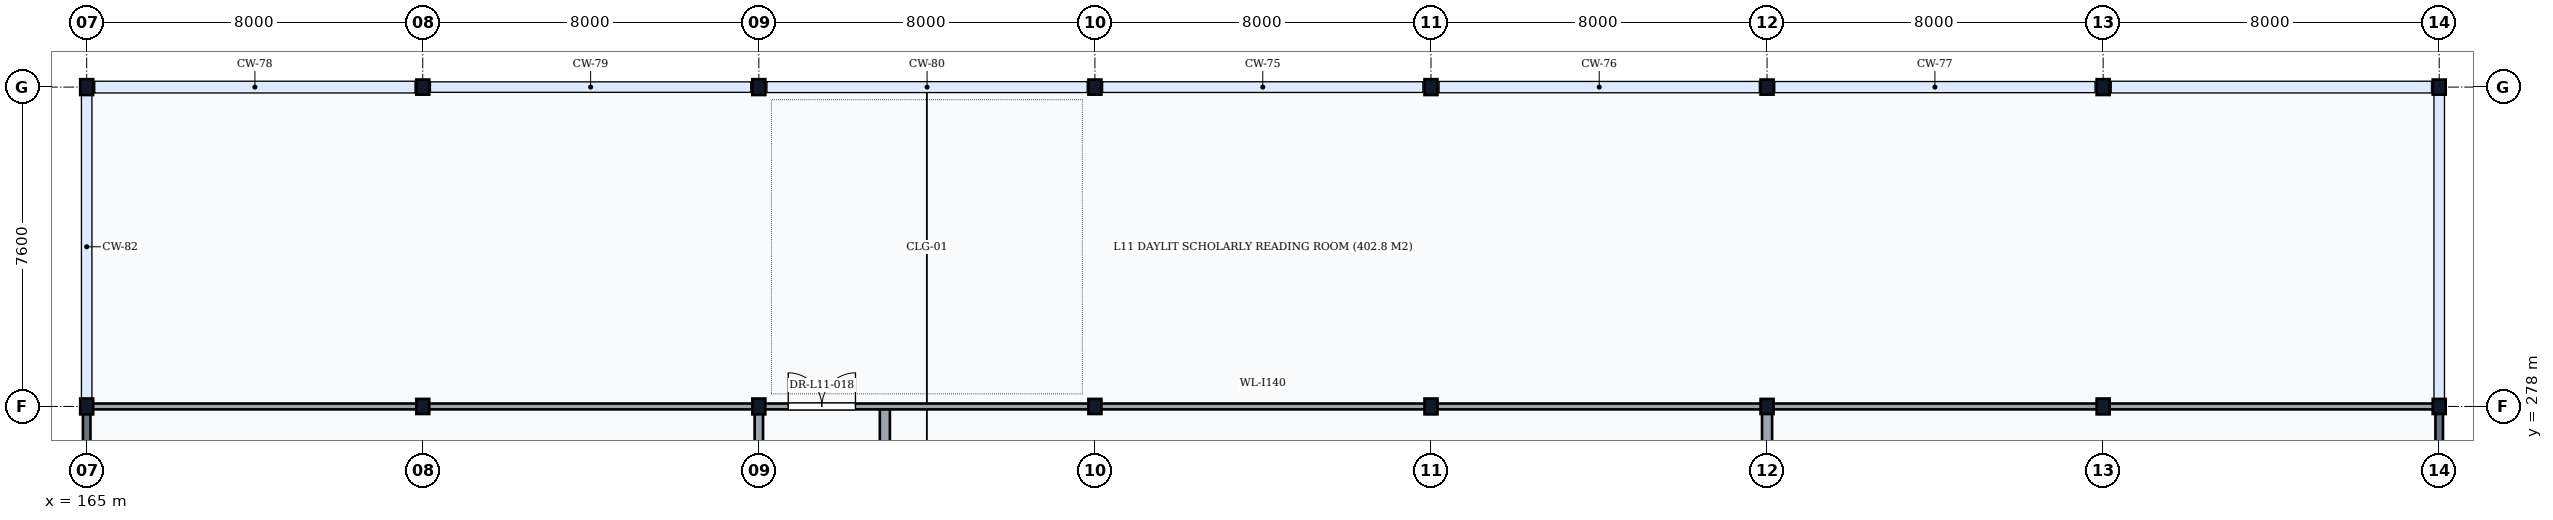
"""IFC4 building model, lengths in metres.
Left out: names, types, materials, properties, quantities, classifications, styles, units other than length and angle.
Written with IfcOpenShell. Run it as: python <this file> out.ifc"""

import sys

from ifc_helpers import new_model, si_unit, direction, frame, frame_2d, origin, origin_2d, place, context, subcontext, project, spatial, rectangle, i_section, extrude, element, fill, save


model = new_model("IFC4")
c1 = context("Model", 3, precision=1e-05, world=origin(), true_north=direction((0.0, 1.0)))
c2 = subcontext(c1, "Body", "Model", "MODEL_VIEW")
j1 = project(units=[si_unit("LENGTHUNIT", "METRE"), si_unit("PLANEANGLEUNIT", "RADIAN")], contexts=[c1])
p1 = place(None, origin())
s1 = spatial("IfcSite", under=j1, at=p1, CompositionType="ELEMENT")
p2 = place(p1, origin())
s2 = spatial("IfcBuilding", under=s1, at=p2, CompositionType="ELEMENT")
p3 = place(p2, frame((0.0, 0.0, 43.8)))
s3 = spatial("IfcBuildingStorey", under=s2, at=p3, CompositionType="ELEMENT", Elevation=43.8)
for number, where, z_axis, x_axis in (
    (1, (165.0, 278.0, 0.0), (0.0, 0.0, 1.0), (1.0, 0.0, 0.0)),
    (2, (165.0, 285.6, 0.0), (0.0, 0.0, 1.0), (1.0, 0.0, 0.0)),
):
    element("IfcColumn", number, at=place(p3, frame(where, z_axis=z_axis, x_axis=x_axis)), inside=s3, PredefinedType="COLUMN", context=c2, shape_type="SweptSolid", body=[
        extrude(i_section(OverallWidth=0.309, OverallDepth=0.377, WebThickness=0.021, FlangeThickness=0.04, FilletRadius=0.027, at=origin_2d()), origin(), (0.0, 0.0, 1.0), 3.9),
    ])
for number, where, z_axis, x_axis in (
    (3, (173.0, 278.0, 0.0), (0.0, 0.0, 1.0), (1.0, 0.0, 0.0)),
    (4, (173.0, 285.6, 0.0), (0.0, 0.0, 1.0), (1.0, 0.0, 0.0)),
):
    element("IfcColumn", number, at=place(p3, frame(where, z_axis=z_axis, x_axis=x_axis)), inside=s3, PredefinedType="COLUMN", context=c2, shape_type="SweptSolid", body=[
        extrude(i_section(OverallWidth=0.309, OverallDepth=0.359, WebThickness=0.021, FlangeThickness=0.04, FilletRadius=0.027, at=origin_2d()), origin(), (0.0, 0.0, 1.0), 3.9),
    ])
for number, where, z_axis, x_axis in (
    (5, (181.0, 278.0, 0.0), (0.0, 0.0, 1.0), (1.0, 0.0, 0.0)),
    (6, (181.0, 285.6, 0.0), (0.0, 0.0, 1.0), (1.0, 0.0, 0.0)),
):
    element("IfcColumn", number, at=place(p3, frame(where, z_axis=z_axis, x_axis=x_axis)), inside=s3, PredefinedType="COLUMN", context=c2, shape_type="SweptSolid", body=[
        extrude(i_section(OverallWidth=0.309, OverallDepth=0.377, WebThickness=0.021, FlangeThickness=0.04, FilletRadius=0.027, at=origin_2d()), origin(), (0.0, 0.0, 1.0), 3.9),
    ])
for number, where, z_axis, x_axis in (
    (7, (189.0, 278.0, 0.0), (0.0, 0.0, 1.0), (1.0, 0.0, 0.0)),
    (8, (189.0, 285.6, 0.0), (0.0, 0.0, 1.0), (1.0, 0.0, 0.0)),
):
    element("IfcColumn", number, at=place(p3, frame(where, z_axis=z_axis, x_axis=x_axis)), inside=s3, PredefinedType="COLUMN", context=c2, shape_type="SweptSolid", body=[
        extrude(i_section(OverallWidth=0.309, OverallDepth=0.359, WebThickness=0.021, FlangeThickness=0.04, FilletRadius=0.027, at=origin_2d()), origin(), (0.0, 0.0, 1.0), 3.9),
    ])
for number, where, z_axis, x_axis in (
    (9, (197.0, 278.0, 0.0), (0.0, 0.0, 1.0), (1.0, 0.0, 0.0)),
    (10, (197.0, 285.6, 0.0), (0.0, 0.0, 1.0), (1.0, 0.0, 0.0)),
):
    element("IfcColumn", number, at=place(p3, frame(where, z_axis=z_axis, x_axis=x_axis)), inside=s3, PredefinedType="COLUMN", context=c2, shape_type="SweptSolid", body=[
        extrude(i_section(OverallWidth=0.309, OverallDepth=0.377, WebThickness=0.021, FlangeThickness=0.04, FilletRadius=0.027, at=origin_2d()), origin(), (0.0, 0.0, 1.0), 3.9),
    ])
for number, where, z_axis, x_axis in (
    (11, (205.0, 278.0, 0.0), (0.0, 0.0, 1.0), (1.0, 0.0, 0.0)),
    (12, (205.0, 285.6, 0.0), (0.0, 0.0, 1.0), (1.0, 0.0, 0.0)),
):
    element("IfcColumn", number, at=place(p3, frame(where, z_axis=z_axis, x_axis=x_axis)), inside=s3, PredefinedType="COLUMN", context=c2, shape_type="SweptSolid", body=[
        extrude(i_section(OverallWidth=0.309, OverallDepth=0.359, WebThickness=0.021, FlangeThickness=0.04, FilletRadius=0.027, at=origin_2d()), origin(), (0.0, 0.0, 1.0), 3.9),
    ])
for number, where, z_axis, x_axis in (
    (13, (213.0, 278.0, 0.0), (0.0, 0.0, 1.0), (1.0, 0.0, 0.0)),
    (14, (213.0, 285.6, 0.0), (0.0, 0.0, 1.0), (1.0, 0.0, 0.0)),
):
    element("IfcColumn", number, at=place(p3, frame(where, z_axis=z_axis, x_axis=x_axis)), inside=s3, PredefinedType="COLUMN", context=c2, shape_type="SweptSolid", body=[
        extrude(i_section(OverallWidth=0.309, OverallDepth=0.377, WebThickness=0.021, FlangeThickness=0.04, FilletRadius=0.027, at=origin_2d()), origin(), (0.0, 0.0, 1.0), 3.9),
    ])
for number, where, z_axis, x_axis in (
    (15, (221.0, 278.0, 0.0), (0.0, 0.0, 1.0), (1.0, 0.0, 0.0)),
    (16, (221.0, 285.6, 0.0), (0.0, 0.0, 1.0), (1.0, 0.0, 0.0)),
):
    element("IfcColumn", number, at=place(p3, frame(where, z_axis=z_axis, x_axis=x_axis)), inside=s3, PredefinedType="COLUMN", context=c2, shape_type="SweptSolid", body=[
        extrude(i_section(OverallWidth=0.309, OverallDepth=0.359, WebThickness=0.021, FlangeThickness=0.04, FilletRadius=0.027, at=origin_2d()), origin(), (0.0, 0.0, 1.0), 3.9),
    ])
p4 = place(p3, frame((165.0, 270.406, 0.0), z_axis=(0.0, 0.0, 1.0), x_axis=(0.0, 1.0, 0.0)))
e17 = element("IfcWall", 17, at=p4, inside=s3, PredefinedType="SOLIDWALL", context=c2, shape_type="SweptSolid", body=[
    extrude(rectangle(XDim=7.588, YDim=0.18, at=frame_2d((3.794, 0.0))), origin(), (0.0, 0.0, 1.0), 3.408),
])
p5 = place(p4, frame((3.194, 0.0, 0.95)))
e18 = element("IfcOpeningElement", 18, at=p5, cuts=e17, PredefinedType="OPENING", context=c2, shape_type="SweptSolid", body=[
    extrude(rectangle(XDim=1.2, YDim=1.8, at=frame_2d((0.6, 0.9))), frame((0.0, 0.105, 0.0), z_axis=(0.0, -1.0, 0.0), x_axis=(1.0, 0.0, 0.0)), (0.0, 0.0, 1.0), 0.21),
])
p6 = place(p3, frame((221.0, 270.406, 0.0), z_axis=(0.0, 0.0, 1.0), x_axis=(0.0, 1.0, 0.0)))
e19 = element("IfcWall", 19, at=p6, inside=s3, PredefinedType="SOLIDWALL", context=c2, shape_type="SweptSolid", body=[
    extrude(rectangle(XDim=7.588, YDim=0.18, at=frame_2d((3.794, 0.0))), origin(), (0.0, 0.0, 1.0), 3.408),
])
p7 = place(p6, frame((3.194, 0.0, 0.95)))
e20 = element("IfcOpeningElement", 20, at=p7, cuts=e19, PredefinedType="OPENING", context=c2, shape_type="SweptSolid", body=[
    extrude(rectangle(XDim=1.2, YDim=1.8, at=frame_2d((0.6, 0.9))), frame((0.0, 0.105, 0.0), z_axis=(0.0, -1.0, 0.0), x_axis=(1.0, 0.0, 0.0)), (0.0, 0.0, 1.0), 0.21),
])
p8 = place(p3, frame((181.0, 258.2, 0.0), z_axis=(0.0, 0.0, 1.0), x_axis=(0.0, 1.0, 0.0)))
e21 = element("IfcWall", 21, at=p8, inside=s3, PredefinedType="PARTITIONING", context=c2, shape_type="SweptSolid", body=[
    extrude(rectangle(XDim=19.8, YDim=0.2, at=frame_2d((9.9, 0.0))), origin(), (0.0, 0.0, 1.0), 3.278),
])
p9 = place(p8, frame((2.025, 0.0, 0.0)))
e22 = element("IfcOpeningElement", 22, at=p9, cuts=e21, PredefinedType="OPENING", context=c2, shape_type="SweptSolid", body=[
    extrude(rectangle(XDim=0.95, YDim=2.1, at=frame_2d((0.475, 1.05))), frame((0.0, 0.115, 0.0), z_axis=(0.0, -1.0, 0.0), x_axis=(1.0, 0.0, 0.0)), (0.0, 0.0, 1.0), 0.23),
])
p10 = place(p8, frame((8.525, 0.0, 0.0)))
e23 = element("IfcOpeningElement", 23, at=p10, cuts=e21, PredefinedType="OPENING", context=c2, shape_type="SweptSolid", body=[
    extrude(rectangle(XDim=0.95, YDim=2.1, at=frame_2d((0.475, 1.05))), frame((0.0, 0.115, 0.0), z_axis=(0.0, -1.0, 0.0), x_axis=(1.0, 0.0, 0.0)), (0.0, 0.0, 1.0), 0.23),
])
p11 = place(p8, frame((15.525, 0.0, 0.0)))
e24 = element("IfcOpeningElement", 24, at=p11, cuts=e21, PredefinedType="OPENING", context=c2, shape_type="SweptSolid", body=[
    extrude(rectangle(XDim=0.95, YDim=2.1, at=frame_2d((0.475, 1.05))), frame((0.0, 0.115, 0.0), z_axis=(0.0, -1.0, 0.0), x_axis=(1.0, 0.0, 0.0)), (0.0, 0.0, 1.0), 0.23),
])
p12 = place(p3, frame((184.0, 258.2, 0.0), z_axis=(0.0, 0.0, 1.0), x_axis=(0.0, 1.0, 0.0)))
e25 = element("IfcWall", 25, at=p12, inside=s3, PredefinedType="PARTITIONING", context=c2, shape_type="SweptSolid", body=[
    extrude(rectangle(XDim=19.8, YDim=0.24, at=frame_2d((9.9, 0.0))), origin(), (0.0, 0.0, 1.0), 3.68),
])
p13 = place(p3, frame((205.0, 258.2, 0.0), z_axis=(0.0, 0.0, 1.0), x_axis=(0.0, 1.0, 0.0)))
e26 = element("IfcWall", 26, at=p13, inside=s3, PredefinedType="PARTITIONING", context=c2, shape_type="SweptSolid", body=[
    extrude(rectangle(XDim=19.8, YDim=0.24, at=frame_2d((9.9, 0.0))), origin(), (0.0, 0.0, 1.0), 3.278),
])
p14 = place(p3, frame((165.0, 278.0, 0.0), z_axis=(0.0, 0.0, 1.0), x_axis=(1.0, 0.0, 0.0)))
e27 = element("IfcWall", 27, at=p14, inside=s3, PredefinedType="PARTITIONING", context=c2, shape_type="SweptSolid", body=[
    extrude(rectangle(XDim=56.0, YDim=0.14, at=frame_2d((28.0, 0.0))), origin(), (0.0, 0.0, 1.0), 3.178),
])
p15 = place(p14, frame((16.7, 0.0, 0.0)))
e28 = element("IfcOpeningElement", 28, at=p15, cuts=e27, PredefinedType="OPENING", context=c2, shape_type="SweptSolid", body=[
    extrude(rectangle(XDim=1.6, YDim=2.25, at=frame_2d((0.8, 1.125))), frame((0.0, 0.085, 0.0), z_axis=(0.0, -1.0, 0.0), x_axis=(1.0, 0.0, 0.0)), (0.0, 0.0, 1.0), 0.17),
])
p16 = place(p15, origin())
e29 = element("IfcDoor", 29, at=p16, inside=s3, OperationType="DOUBLE_DOOR_SINGLE_SWING", PredefinedType="DOOR", context=c2, shape_type="SweptSolid", body=[
    extrude(rectangle(XDim=1.6, YDim=2.25, at=frame_2d((0.8, 1.125))), frame((0.0, 0.025, 0.0), z_axis=(0.0, -1.0, 0.0), x_axis=(1.0, 0.0, 0.0)), (0.0, 0.0, 1.0), 0.05),
])
fill(e28, e29)
save(model, sys.argv[1])
